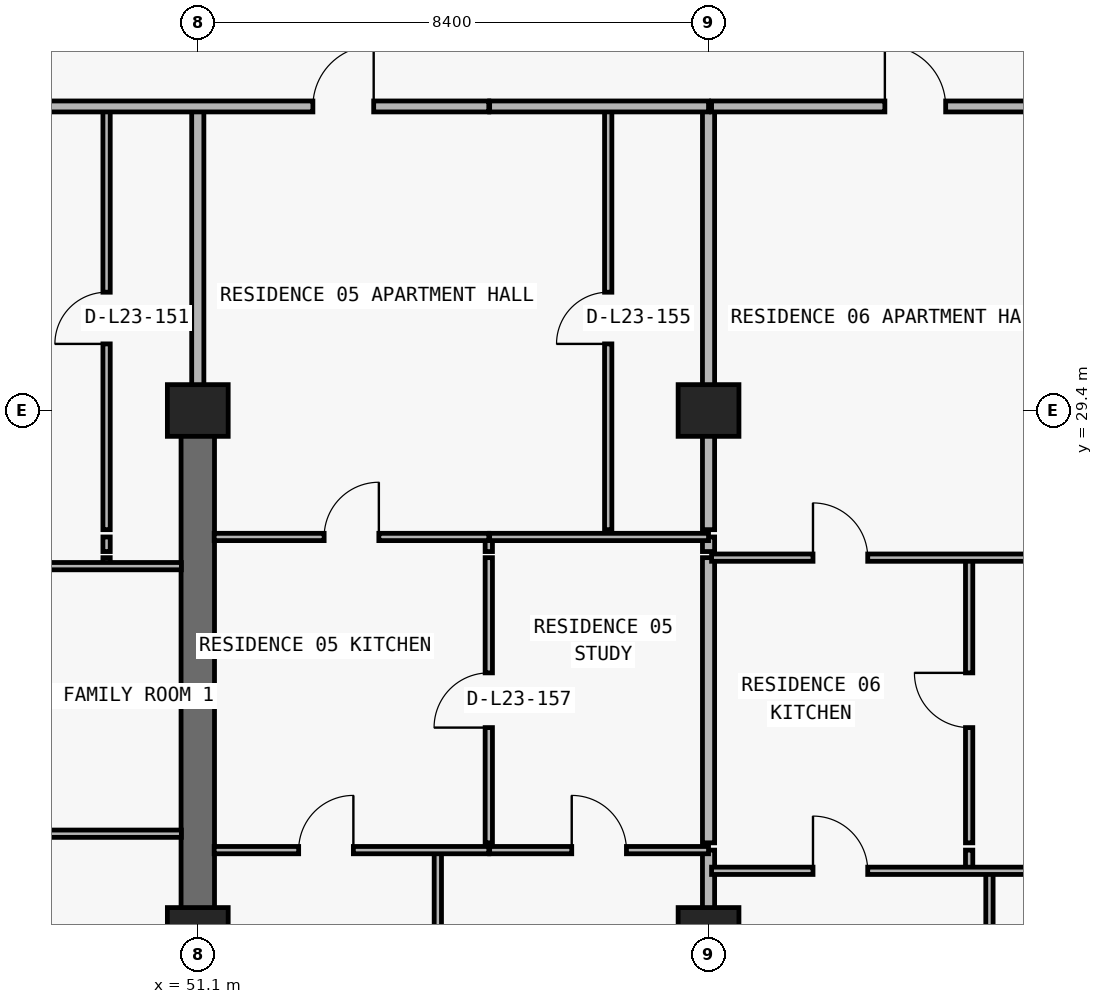
"""IFC4 building model, lengths in metres.
Left out: names, types, materials, properties, quantities, classifications, styles, units other than length and angle.
Written with IfcOpenShell. Run it as: python <this file> out.ifc"""

import sys

from ifc_helpers import new_model, si_unit, direction, frame, frame_2d, origin, origin_2d, place, context, subcontext, project, spatial, rectangle, extrude, element, fill, save


model = new_model("IFC4")
c1 = context("Model", 3, precision=1e-05, world=origin(), true_north=direction((0.0, 1.0)))
c2 = subcontext(c1, "Body", "Model", "MODEL_VIEW")
j1 = project(units=[si_unit("LENGTHUNIT", "METRE"), si_unit("PLANEANGLEUNIT", "RADIAN")], contexts=[c1])
p1 = place(None, origin())
s1 = spatial("IfcSite", under=j1, at=p1, CompositionType="ELEMENT")
p2 = place(p1, origin())
s2 = spatial("IfcBuilding", under=s1, at=p2, CompositionType="ELEMENT")
p3 = place(p2, frame((0.0, 0.0, 87.9)))
s3 = spatial("IfcBuildingStorey", under=s2, at=p3, CompositionType="ELEMENT", Elevation=87.9)
for number, where, z_axis, x_axis in (
    (1, (51.1, 20.8, 0.0), (0.0, 0.0, 1.0), (1.0, 0.0, 0.0)),
    (2, (59.5, 20.8, 0.0), (0.0, 0.0, 1.0), (1.0, 0.0, 0.0)),
    (3, (51.1, 29.4, 0.0), (0.0, 0.0, 1.0), (1.0, 0.0, 0.0)),
    (4, (59.5, 29.4, 0.0), (0.0, 0.0, 1.0), (1.0, 0.0, 0.0)),
):
    element("IfcColumn", number, at=place(p3, frame(where, z_axis=z_axis, x_axis=x_axis)), inside=s3, PredefinedType="COLUMN", context=c2, shape_type="SweptSolid", body=[
        extrude(rectangle(XDim=1.0, YDim=0.85, at=origin_2d()), origin(), (0.0, 0.0, 1.0), 3.05),
    ])
p4 = place(p3, frame((51.1, 20.8, 0.0), z_axis=(0.0, 0.0, 1.0), x_axis=(0.0, 1.0, 0.0)))
e5 = element("IfcWall", 5, at=p4, inside=s3, PredefinedType="SHEAR", context=c2, shape_type="SweptSolid", body=[
    extrude(rectangle(XDim=8.6, YDim=0.55, at=frame_2d((4.3, 0.0))), origin(), (0.0, 0.0, 1.0), 3.05),
])
p5 = place(p3, frame((49.6, 26.84, 0.0), z_axis=(0.0, 0.0, 1.0), x_axis=(0.0, 1.0, 0.0)))
e6 = element("IfcWall", 6, at=p5, inside=s3, PredefinedType="PARTITIONING", context=c2, shape_type="SweptSolid", body=[
    extrude(rectangle(XDim=0.14, YDim=0.12, at=frame_2d((0.07, 0.0))), origin(), (0.0, 0.0, 1.0), 3.05),
])
p6 = place(p3, frame((49.6, 27.08, 0.0), z_axis=(0.0, 0.0, 1.0), x_axis=(0.0, 1.0, 0.0)))
e7 = element("IfcWall", 7, at=p6, inside=s3, PredefinedType="PARTITIONING", context=c2, shape_type="SweptSolid", body=[
    extrude(rectangle(XDim=0.24, YDim=0.12, at=frame_2d((0.12, 0.0))), origin(), (0.0, 0.0, 1.0), 3.05),
])
p7 = place(p3, frame((49.6, 27.44, 0.0), z_axis=(0.0, 0.0, 1.0), x_axis=(0.0, 1.0, 0.0)))
e8 = element("IfcWall", 8, at=p7, inside=s3, PredefinedType="PARTITIONING", context=c2, shape_type="SweptSolid", body=[
    extrude(rectangle(XDim=6.96, YDim=0.12, at=frame_2d((3.48, 0.0))), origin(), (0.0, 0.0, 1.0), 3.05),
])
p8 = place(p7, frame((3.055, 0.0, 0.0)))
e9 = element("IfcOpeningElement", 9, at=p8, cuts=e8, PredefinedType="OPENING", context=c2, shape_type="SweptSolid", body=[
    extrude(rectangle(XDim=0.85, YDim=2.1, at=frame_2d((0.425, 1.05))), frame((0.0, 0.07, 0.0), z_axis=(0.0, -1.0, 0.0), x_axis=(1.0, 0.0, 0.0)), (0.0, 0.0, 1.0), 0.14),
])
p9 = place(p3, frame((51.1, 29.405, 0.0), z_axis=(0.0, 0.0, 1.0), x_axis=(0.0, 1.0, 0.0)))
e10 = element("IfcWall", 10, at=p9, inside=s3, PredefinedType="PARTITIONING", context=c2, shape_type="SweptSolid", body=[
    extrude(rectangle(XDim=4.995, YDim=0.2, at=frame_2d((2.498, 0.0))), origin(), (0.0, 0.0, 1.0), 2.335),
])
p10 = place(p3, frame((55.048, 8.84, 0.0), z_axis=(0.0, 0.0, 1.0), x_axis=(0.0, 1.0, 0.0)))
e11 = element("IfcWall", 11, at=p10, inside=s3, PredefinedType="PARTITIONING", context=c2, shape_type="SweptSolid", body=[
    extrude(rectangle(XDim=13.33, YDim=0.12, at=frame_2d((6.665, 0.0))), origin(), (0.0, 0.0, 1.0), 3.05),
])
p11 = place(p3, frame((55.886, 22.29, 0.0), z_axis=(0.0, 0.0, 1.0), x_axis=(0.0, 1.0, 0.0)))
e12 = element("IfcWall", 12, at=p11, inside=s3, PredefinedType="PARTITIONING", context=c2, shape_type="SweptSolid", body=[
    extrude(rectangle(XDim=4.69, YDim=0.12, at=frame_2d((2.345, 0.0))), origin(), (0.0, 0.0, 1.0), 3.05),
])
p12 = place(p11, frame((1.895, 0.0, 0.0)))
e13 = element("IfcOpeningElement", 13, at=p12, cuts=e12, PredefinedType="OPENING", context=c2, shape_type="SweptSolid", body=[
    extrude(rectangle(XDim=0.9, YDim=2.15, at=frame_2d((0.45, 1.075))), frame((0.0, 0.07, 0.0), z_axis=(0.0, -1.0, 0.0), x_axis=(1.0, 0.0, 0.0)), (0.0, 0.0, 1.0), 0.14),
])
p13 = place(p3, frame((55.886, 27.08, 0.0), z_axis=(0.0, 0.0, 1.0), x_axis=(0.0, 1.0, 0.0)))
e14 = element("IfcWall", 14, at=p13, inside=s3, PredefinedType="PARTITIONING", context=c2, shape_type="SweptSolid", body=[
    extrude(rectangle(XDim=0.24, YDim=0.12, at=frame_2d((0.12, 0.0))), origin(), (0.0, 0.0, 1.0), 3.05),
])
p14 = place(p3, frame((57.85, 27.44, 0.0), z_axis=(0.0, 0.0, 1.0), x_axis=(0.0, 1.0, 0.0)))
e15 = element("IfcWall", 15, at=p14, inside=s3, PredefinedType="PARTITIONING", context=c2, shape_type="SweptSolid", body=[
    extrude(rectangle(XDim=6.96, YDim=0.12, at=frame_2d((3.48, 0.0))), origin(), (0.0, 0.0, 1.0), 3.05),
])
p15 = place(p14, frame((3.055, 0.0, 0.0)))
e16 = element("IfcOpeningElement", 16, at=p15, cuts=e15, PredefinedType="OPENING", context=c2, shape_type="SweptSolid", body=[
    extrude(rectangle(XDim=0.85, YDim=2.1, at=frame_2d((0.425, 1.05))), frame((0.0, 0.07, 0.0), z_axis=(0.0, -1.0, 0.0), x_axis=(1.0, 0.0, 0.0)), (0.0, 0.0, 1.0), 0.14),
])
p16 = place(p3, frame((59.5, 8.84, 0.0), z_axis=(0.0, 0.0, 1.0), x_axis=(0.0, 1.0, 0.0)))
e17 = element("IfcWall", 17, at=p16, inside=s3, PredefinedType="PARTITIONING", context=c2, shape_type="SweptSolid", body=[
    extrude(rectangle(XDim=13.33, YDim=0.2, at=frame_2d((6.665, 0.0))), origin(), (0.0, 0.0, 1.0), 2.174),
])
p17 = place(p3, frame((59.5, 22.29, 0.0), z_axis=(0.0, 0.0, 1.0), x_axis=(0.0, 1.0, 0.0)))
e18 = element("IfcWall", 18, at=p17, inside=s3, PredefinedType="PARTITIONING", context=c2, shape_type="SweptSolid", body=[
    extrude(rectangle(XDim=4.69, YDim=0.2, at=frame_2d((2.345, 0.0))), origin(), (0.0, 0.0, 1.0), 2.174),
])
p18 = place(p3, frame((59.5, 27.08, 0.0), z_axis=(0.0, 0.0, 1.0), x_axis=(0.0, 1.0, 0.0)))
e19 = element("IfcWall", 19, at=p18, inside=s3, PredefinedType="PARTITIONING", context=c2, shape_type="SweptSolid", body=[
    extrude(rectangle(XDim=0.24, YDim=0.2, at=frame_2d((0.12, 0.0))), origin(), (0.0, 0.0, 1.0), 2.174),
])
p19 = place(p3, frame((59.5, 27.44, 0.0), z_axis=(0.0, 0.0, 1.0), x_axis=(0.0, 1.0, 0.0)))
e20 = element("IfcWall", 20, at=p19, inside=s3, PredefinedType="PARTITIONING", context=c2, shape_type="SweptSolid", body=[
    extrude(rectangle(XDim=6.96, YDim=0.2, at=frame_2d((3.48, 0.0))), origin(), (0.0, 0.0, 1.0), 2.174),
])
p20 = place(p3, frame((63.786, 21.83, 0.0), z_axis=(0.0, 0.0, 1.0), x_axis=(0.0, 1.0, 0.0)))
e21 = element("IfcWall", 21, at=p20, inside=s3, PredefinedType="PARTITIONING", context=c2, shape_type="SweptSolid", body=[
    extrude(rectangle(XDim=0.34, YDim=0.12, at=frame_2d((0.17, 0.0))), origin(), (0.0, 0.0, 1.0), 3.05),
])
p21 = place(p3, frame((63.786, 22.29, 0.0), z_axis=(0.0, 0.0, 1.0), x_axis=(0.0, 1.0, 0.0)))
e22 = element("IfcWall", 22, at=p21, inside=s3, PredefinedType="PARTITIONING", context=c2, shape_type="SweptSolid", body=[
    extrude(rectangle(XDim=4.69, YDim=0.12, at=frame_2d((2.345, 0.0))), origin(), (0.0, 0.0, 1.0), 3.05),
])
p22 = place(p21, frame((1.895, 0.0, 0.0)))
e23 = element("IfcOpeningElement", 23, at=p22, cuts=e22, PredefinedType="OPENING", context=c2, shape_type="SweptSolid", body=[
    extrude(rectangle(XDim=0.9, YDim=2.15, at=frame_2d((0.45, 1.075))), frame((0.0, 0.07, 0.0), z_axis=(0.0, -1.0, 0.0), x_axis=(1.0, 0.0, 0.0)), (0.0, 0.0, 1.0), 0.14),
])
p23 = place(p3, frame((64.12, 8.84, 0.0), z_axis=(0.0, 0.0, 1.0), x_axis=(0.0, 1.0, 0.0)))
e24 = element("IfcWall", 24, at=p23, inside=s3, PredefinedType="PARTITIONING", context=c2, shape_type="SweptSolid", body=[
    extrude(rectangle(XDim=12.99, YDim=0.12, at=frame_2d((6.495, 0.0))), origin(), (0.0, 0.0, 1.0), 3.05),
])
p24 = place(p3, frame((59.55, 21.83, 0.0), z_axis=(0.0, 0.0, 1.0), x_axis=(1.0, 0.0, 0.0)))
e25 = element("IfcWall", 25, at=p24, inside=s3, PredefinedType="PARTITIONING", context=c2, shape_type="SweptSolid", body=[
    extrude(rectangle(XDim=8.35, YDim=0.12, at=frame_2d((4.175, 0.0))), origin(), (0.0, 0.0, 1.0), 3.05),
])
p25 = place(p24, frame((1.668, 0.0, 0.0)))
e26 = element("IfcOpeningElement", 26, at=p25, cuts=e25, PredefinedType="OPENING", context=c2, shape_type="SweptSolid", body=[
    extrude(rectangle(XDim=0.9, YDim=2.15, at=frame_2d((0.45, 1.075))), frame((0.0, 0.07, 0.0), z_axis=(0.0, -1.0, 0.0), x_axis=(1.0, 0.0, 0.0)), (0.0, 0.0, 1.0), 0.14),
])
p26 = place(p24, frame((6.01, 0.0, 0.0)))
e27 = element("IfcOpeningElement", 27, at=p26, cuts=e25, PredefinedType="OPENING", context=c2, shape_type="SweptSolid", body=[
    extrude(rectangle(XDim=0.9, YDim=2.15, at=frame_2d((0.45, 1.075))), frame((0.0, 0.07, 0.0), z_axis=(0.0, -1.0, 0.0), x_axis=(1.0, 0.0, 0.0)), (0.0, 0.0, 1.0), 0.14),
])
p27 = place(p3, frame((51.37, 22.17, 0.0), z_axis=(0.0, 0.0, 1.0), x_axis=(1.0, 0.0, 0.0)))
e28 = element("IfcWall", 28, at=p27, inside=s3, PredefinedType="PARTITIONING", context=c2, shape_type="SweptSolid", body=[
    extrude(rectangle(XDim=4.516, YDim=0.12, at=frame_2d((2.258, 0.0))), origin(), (0.0, 0.0, 1.0), 3.05),
])
p28 = place(p27, frame((1.389, 0.0, 0.0)))
e29 = element("IfcOpeningElement", 29, at=p28, cuts=e28, PredefinedType="OPENING", context=c2, shape_type="SweptSolid", body=[
    extrude(rectangle(XDim=0.9, YDim=2.15, at=frame_2d((0.45, 1.075))), frame((0.0, 0.07, 0.0), z_axis=(0.0, -1.0, 0.0), x_axis=(1.0, 0.0, 0.0)), (0.0, 0.0, 1.0), 0.14),
])
p29 = place(p3, frame((55.9, 22.17, 0.0), z_axis=(0.0, 0.0, 1.0), x_axis=(1.0, 0.0, 0.0)))
e30 = element("IfcWall", 30, at=p29, inside=s3, PredefinedType="PARTITIONING", context=c2, shape_type="SweptSolid", body=[
    extrude(rectangle(XDim=3.6, YDim=0.12, at=frame_2d((1.8, 0.0))), origin(), (0.0, 0.0, 1.0), 3.05),
])
p30 = place(p29, frame((1.35, 0.0, 0.0)))
e31 = element("IfcOpeningElement", 31, at=p30, cuts=e30, PredefinedType="OPENING", context=c2, shape_type="SweptSolid", body=[
    extrude(rectangle(XDim=0.9, YDim=2.15, at=frame_2d((0.45, 1.075))), frame((0.0, 0.07, 0.0), z_axis=(0.0, -1.0, 0.0), x_axis=(1.0, 0.0, 0.0)), (0.0, 0.0, 1.0), 0.14),
])
p31 = place(p3, frame((42.7, 22.44, 0.0), z_axis=(0.0, 0.0, 1.0), x_axis=(1.0, 0.0, 0.0)))
e32 = element("IfcWall", 32, at=p31, inside=s3, PredefinedType="PARTITIONING", context=c2, shape_type="SweptSolid", body=[
    extrude(rectangle(XDim=8.13, YDim=0.12, at=frame_2d((4.065, 0.0))), origin(), (0.0, 0.0, 1.0), 3.05),
])
p32 = place(p31, frame((3.615, 0.0, 0.0)))
e33 = element("IfcOpeningElement", 33, at=p32, cuts=e32, PredefinedType="OPENING", context=c2, shape_type="SweptSolid", body=[
    extrude(rectangle(XDim=0.9, YDim=2.15, at=frame_2d((0.45, 1.075))), frame((0.0, 0.07, 0.0), z_axis=(0.0, -1.0, 0.0), x_axis=(1.0, 0.0, 0.0)), (0.0, 0.0, 1.0), 0.14),
])
p33 = place(p3, frame((42.7, 26.84, 0.0), z_axis=(0.0, 0.0, 1.0), x_axis=(1.0, 0.0, 0.0)))
e34 = element("IfcWall", 34, at=p33, inside=s3, PredefinedType="PARTITIONING", context=c2, shape_type="SweptSolid", body=[
    extrude(rectangle(XDim=8.13, YDim=0.12, at=frame_2d((4.065, 0.0))), origin(), (0.0, 0.0, 1.0), 3.05),
])
p34 = place(p33, frame((3.0, 0.0, 0.0)))
e35 = element("IfcOpeningElement", 35, at=p34, cuts=e34, PredefinedType="OPENING", context=c2, shape_type="SweptSolid", body=[
    extrude(rectangle(XDim=0.9, YDim=2.15, at=frame_2d((0.45, 1.075))), frame((0.0, 0.07, 0.0), z_axis=(0.0, -1.0, 0.0), x_axis=(1.0, 0.0, 0.0)), (0.0, 0.0, 1.0), 0.14),
])
p35 = place(p3, frame((59.55, 26.98, 0.0), z_axis=(0.0, 0.0, 1.0), x_axis=(1.0, 0.0, 0.0)))
e36 = element("IfcWall", 36, at=p35, inside=s3, PredefinedType="PARTITIONING", context=c2, shape_type="SweptSolid", body=[
    extrude(rectangle(XDim=8.35, YDim=0.12, at=frame_2d((4.175, 0.0))), origin(), (0.0, 0.0, 1.0), 3.05),
])
p36 = place(p35, frame((1.668, 0.0, 0.0)))
e37 = element("IfcOpeningElement", 37, at=p36, cuts=e36, PredefinedType="OPENING", context=c2, shape_type="SweptSolid", body=[
    extrude(rectangle(XDim=0.9, YDim=2.15, at=frame_2d((0.45, 1.075))), frame((0.0, 0.07, 0.0), z_axis=(0.0, -1.0, 0.0), x_axis=(1.0, 0.0, 0.0)), (0.0, 0.0, 1.0), 0.14),
])
p37 = place(p3, frame((51.37, 27.32, 0.0), z_axis=(0.0, 0.0, 1.0), x_axis=(1.0, 0.0, 0.0)))
e38 = element("IfcWall", 38, at=p37, inside=s3, PredefinedType="PARTITIONING", context=c2, shape_type="SweptSolid", body=[
    extrude(rectangle(XDim=4.516, YDim=0.12, at=frame_2d((2.258, 0.0))), origin(), (0.0, 0.0, 1.0), 3.05),
])
p38 = place(p37, frame((1.808, 0.0, 0.0)))
e39 = element("IfcOpeningElement", 39, at=p38, cuts=e38, PredefinedType="OPENING", context=c2, shape_type="SweptSolid", body=[
    extrude(rectangle(XDim=0.9, YDim=2.15, at=frame_2d((0.45, 1.075))), frame((0.0, 0.07, 0.0), z_axis=(0.0, -1.0, 0.0), x_axis=(1.0, 0.0, 0.0)), (0.0, 0.0, 1.0), 0.14),
])
p39 = place(p3, frame((55.9, 27.32, 0.0), z_axis=(0.0, 0.0, 1.0), x_axis=(1.0, 0.0, 0.0)))
e40 = element("IfcWall", 40, at=p39, inside=s3, PredefinedType="PARTITIONING", context=c2, shape_type="SweptSolid", body=[
    extrude(rectangle(XDim=3.6, YDim=0.12, at=frame_2d((1.8, 0.0))), origin(), (0.0, 0.0, 1.0), 3.05),
])
p40 = place(p3, frame((26.7, 34.4, 0.0), z_axis=(0.0, 0.0, 1.0), x_axis=(1.0, 0.0, 0.0)))
e41 = element("IfcWall", 41, at=p40, inside=s3, PredefinedType="PARTITIONING", context=c2, shape_type="SweptSolid", body=[
    extrude(rectangle(XDim=29.186, YDim=0.18, at=frame_2d((14.593, 0.0))), origin(), (0.0, 0.0, 1.0), 3.05),
])
p41 = place(p40, frame((2.875, 0.0, 0.0)))
e42 = element("IfcOpeningElement", 42, at=p41, cuts=e41, PredefinedType="OPENING", context=c2, shape_type="SweptSolid", body=[
    extrude(rectangle(XDim=1.0, YDim=2.2, at=frame_2d((0.5, 1.1))), frame((0.0, 0.1, 0.0), z_axis=(0.0, -1.0, 0.0), x_axis=(1.0, 0.0, 0.0)), (0.0, 0.0, 1.0), 0.2),
])
p42 = place(p40, frame((10.95, 0.0, 0.0)))
e43 = element("IfcOpeningElement", 43, at=p42, cuts=e41, PredefinedType="OPENING", context=c2, shape_type="SweptSolid", body=[
    extrude(rectangle(XDim=1.0, YDim=2.2, at=frame_2d((0.5, 1.1))), frame((0.0, 0.1, 0.0), z_axis=(0.0, -1.0, 0.0), x_axis=(1.0, 0.0, 0.0)), (0.0, 0.0, 1.0), 0.2),
])
p43 = place(p40, frame((26.293, 0.0, 0.0)))
e44 = element("IfcOpeningElement", 44, at=p43, cuts=e41, PredefinedType="OPENING", context=c2, shape_type="SweptSolid", body=[
    extrude(rectangle(XDim=1.0, YDim=2.2, at=frame_2d((0.5, 1.1))), frame((0.0, 0.1, 0.0), z_axis=(0.0, -1.0, 0.0), x_axis=(1.0, 0.0, 0.0)), (0.0, 0.0, 1.0), 0.2),
])
p44 = place(p3, frame((55.9, 34.4, 0.0), z_axis=(0.0, 0.0, 1.0), x_axis=(1.0, 0.0, 0.0)))
e45 = element("IfcWall", 45, at=p44, inside=s3, PredefinedType="PARTITIONING", context=c2, shape_type="SweptSolid", body=[
    extrude(rectangle(XDim=3.6, YDim=0.18, at=frame_2d((1.8, 0.0))), origin(), (0.0, 0.0, 1.0), 3.05),
])
p45 = place(p3, frame((59.55, 34.4, 0.0), z_axis=(0.0, 0.0, 1.0), x_axis=(1.0, 0.0, 0.0)))
e46 = element("IfcWall", 46, at=p45, inside=s3, PredefinedType="PARTITIONING", context=c2, shape_type="SweptSolid", body=[
    extrude(rectangle(XDim=10.55, YDim=0.18, at=frame_2d((5.275, 0.0))), origin(), (0.0, 0.0, 1.0), 3.05),
])
p46 = place(p45, frame((2.85, 0.0, 0.0)))
e47 = element("IfcOpeningElement", 47, at=p46, cuts=e46, PredefinedType="OPENING", context=c2, shape_type="SweptSolid", body=[
    extrude(rectangle(XDim=1.0, YDim=2.2, at=frame_2d((0.5, 1.1))), frame((0.0, 0.1, 0.0), z_axis=(0.0, -1.0, 0.0), x_axis=(1.0, 0.0, 0.0)), (0.0, 0.0, 1.0), 0.2),
])
p47 = place(p8, origin())
e48 = element("IfcDoor", 48, at=p47, inside=s3, OperationType="SINGLE_SWING_LEFT", PredefinedType="DOOR", context=c2, shape_type="SweptSolid", body=[
    extrude(rectangle(XDim=0.85, YDim=2.1, at=frame_2d((0.425, 1.05))), frame((0.0, 0.025, 0.0), z_axis=(0.0, -1.0, 0.0), x_axis=(1.0, 0.0, 0.0)), (0.0, 0.0, 1.0), 0.05),
])
fill(e9, e48)
p48 = place(p43, origin())
e49 = element("IfcDoor", 49, at=p48, inside=s3, OperationType="SINGLE_SWING_RIGHT", PredefinedType="DOOR", context=c2, shape_type="SweptSolid", body=[
    extrude(rectangle(XDim=1.0, YDim=2.2, at=frame_2d((0.5, 1.1))), frame((0.0, 0.025, 0.0), z_axis=(0.0, -1.0, 0.0), x_axis=(1.0, 0.0, 0.0)), (0.0, 0.0, 1.0), 0.05),
])
fill(e44, e49)
p49 = place(p15, origin())
e50 = element("IfcDoor", 50, at=p49, inside=s3, OperationType="SINGLE_SWING_LEFT", PredefinedType="DOOR", context=c2, shape_type="SweptSolid", body=[
    extrude(rectangle(XDim=0.85, YDim=2.1, at=frame_2d((0.425, 1.05))), frame((0.0, 0.025, 0.0), z_axis=(0.0, -1.0, 0.0), x_axis=(1.0, 0.0, 0.0)), (0.0, 0.0, 1.0), 0.05),
])
fill(e16, e50)
p50 = place(p38, origin())
e51 = element("IfcDoor", 51, at=p50, inside=s3, OperationType="SINGLE_SWING_RIGHT", PredefinedType="DOOR", context=c2, shape_type="SweptSolid", body=[
    extrude(rectangle(XDim=0.9, YDim=2.15, at=frame_2d((0.45, 1.075))), frame((0.0, 0.025, 0.0), z_axis=(0.0, -1.0, 0.0), x_axis=(1.0, 0.0, 0.0)), (0.0, 0.0, 1.0), 0.05),
])
fill(e39, e51)
p51 = place(p12, origin())
e52 = element("IfcDoor", 52, at=p51, inside=s3, OperationType="SINGLE_SWING_LEFT", PredefinedType="DOOR", context=c2, shape_type="SweptSolid", body=[
    extrude(rectangle(XDim=0.9, YDim=2.15, at=frame_2d((0.45, 1.075))), frame((0.0, 0.025, 0.0), z_axis=(0.0, -1.0, 0.0), x_axis=(1.0, 0.0, 0.0)), (0.0, 0.0, 1.0), 0.05),
])
fill(e13, e52)
p52 = place(p28, origin())
e53 = element("IfcDoor", 53, at=p52, inside=s3, OperationType="SINGLE_SWING_RIGHT", PredefinedType="DOOR", context=c2, shape_type="SweptSolid", body=[
    extrude(rectangle(XDim=0.9, YDim=2.15, at=frame_2d((0.45, 1.075))), frame((0.0, 0.025, 0.0), z_axis=(0.0, -1.0, 0.0), x_axis=(1.0, 0.0, 0.0)), (0.0, 0.0, 1.0), 0.05),
])
fill(e29, e53)
p53 = place(p30, origin())
e54 = element("IfcDoor", 54, at=p53, inside=s3, OperationType="SINGLE_SWING_LEFT", PredefinedType="DOOR", context=c2, shape_type="SweptSolid", body=[
    extrude(rectangle(XDim=0.9, YDim=2.15, at=frame_2d((0.45, 1.075))), frame((0.0, 0.025, 0.0), z_axis=(0.0, -1.0, 0.0), x_axis=(1.0, 0.0, 0.0)), (0.0, 0.0, 1.0), 0.05),
])
fill(e31, e54)
p54 = place(p46, origin())
e55 = element("IfcDoor", 55, at=p54, inside=s3, OperationType="SINGLE_SWING_LEFT", PredefinedType="DOOR", context=c2, shape_type="SweptSolid", body=[
    extrude(rectangle(XDim=1.0, YDim=2.2, at=frame_2d((0.5, 1.1))), frame((0.0, 0.025, 0.0), z_axis=(0.0, -1.0, 0.0), x_axis=(1.0, 0.0, 0.0)), (0.0, 0.0, 1.0), 0.05),
])
fill(e47, e55)
p55 = place(p36, origin())
e56 = element("IfcDoor", 56, at=p55, inside=s3, OperationType="SINGLE_SWING_LEFT", PredefinedType="DOOR", context=c2, shape_type="SweptSolid", body=[
    extrude(rectangle(XDim=0.9, YDim=2.15, at=frame_2d((0.45, 1.075))), frame((0.0, 0.025, 0.0), z_axis=(0.0, -1.0, 0.0), x_axis=(1.0, 0.0, 0.0)), (0.0, 0.0, 1.0), 0.05),
])
fill(e37, e56)
p56 = place(p22, origin())
e57 = element("IfcDoor", 57, at=p56, inside=s3, OperationType="SINGLE_SWING_RIGHT", PredefinedType="DOOR", context=c2, shape_type="SweptSolid", body=[
    extrude(rectangle(XDim=0.9, YDim=2.15, at=frame_2d((0.45, 1.075))), frame((0.0, 0.025, 0.0), z_axis=(0.0, -1.0, 0.0), x_axis=(1.0, 0.0, 0.0)), (0.0, 0.0, 1.0), 0.05),
])
fill(e23, e57)
p57 = place(p25, origin())
e58 = element("IfcDoor", 58, at=p57, inside=s3, OperationType="SINGLE_SWING_LEFT", PredefinedType="DOOR", context=c2, shape_type="SweptSolid", body=[
    extrude(rectangle(XDim=0.9, YDim=2.15, at=frame_2d((0.45, 1.075))), frame((0.0, 0.025, 0.0), z_axis=(0.0, -1.0, 0.0), x_axis=(1.0, 0.0, 0.0)), (0.0, 0.0, 1.0), 0.05),
])
fill(e26, e58)
save(model, sys.argv[1])
